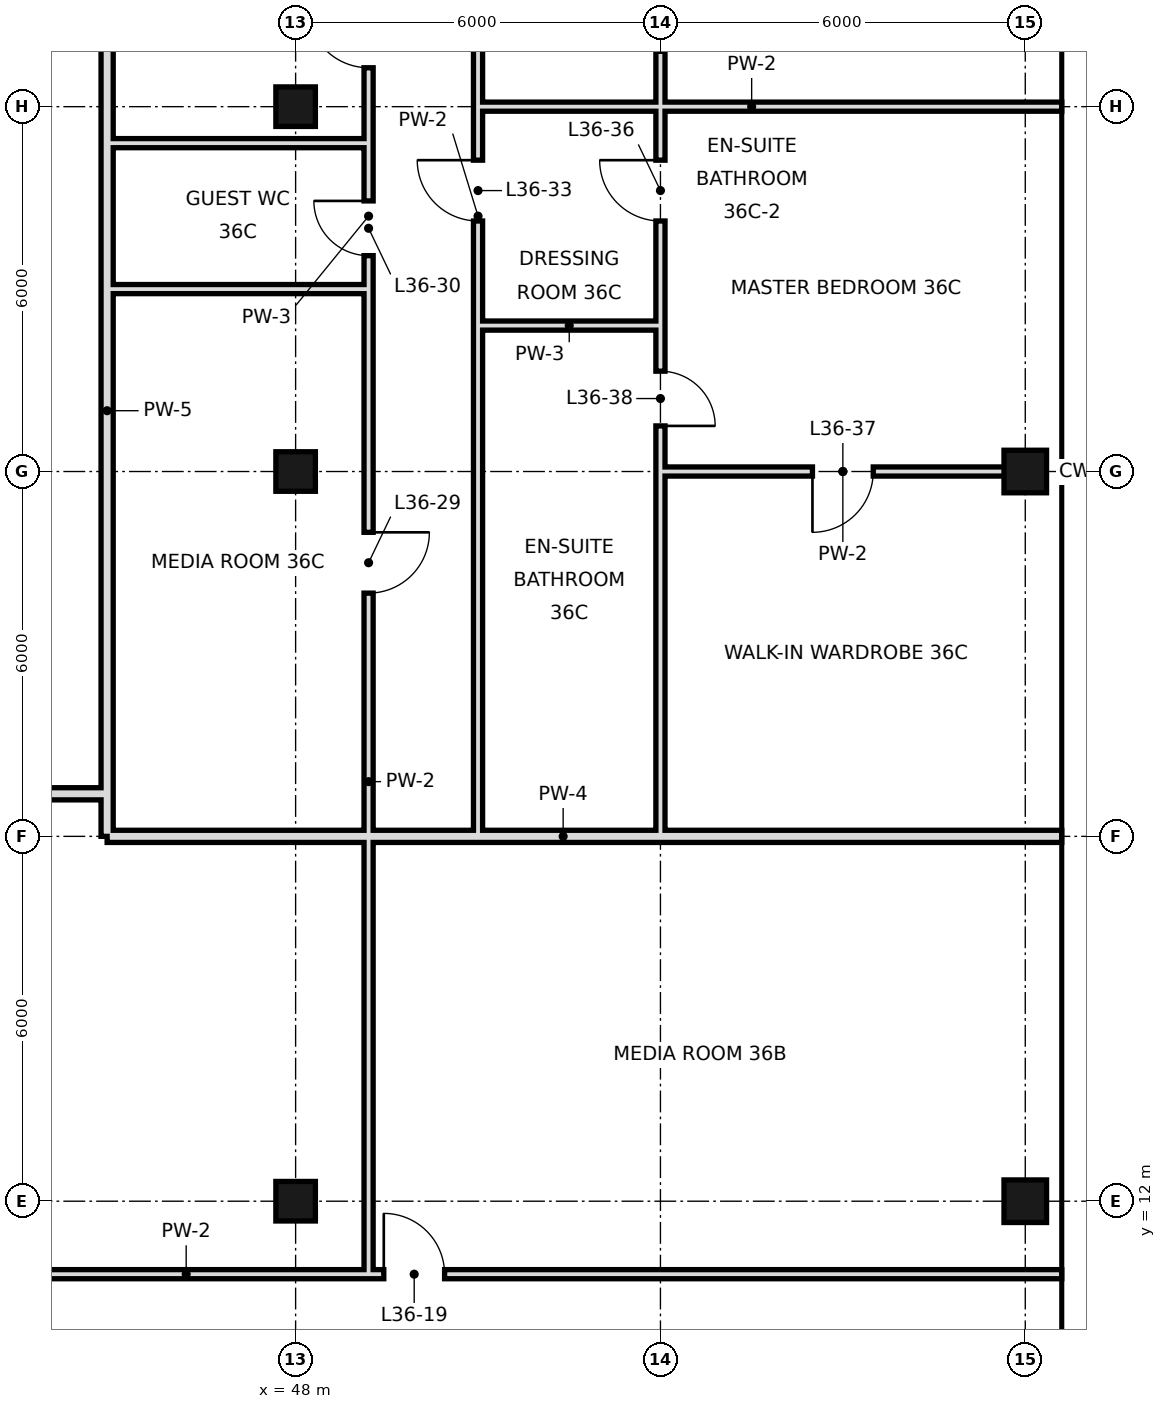
"""IFC4 building model, lengths in metres.
Left out: names, types, materials, properties, quantities, classifications, styles, units other than length and angle.
Written with IfcOpenShell. Run it as: python <this file> out.ifc"""

import sys

from ifc_helpers import new_model, si_unit, direction, frame, frame_2d, origin, origin_2d, place, context, subcontext, project, spatial, rectangle, hollow_rectangle, extrude, element, fill, save


model = new_model("IFC4")
c1 = context("Model", 3, precision=1e-05, world=origin(), true_north=direction((0.0, 1.0)))
c2 = subcontext(c1, "Body", "Model", "MODEL_VIEW")
j1 = project(units=[si_unit("LENGTHUNIT", "METRE"), si_unit("PLANEANGLEUNIT", "RADIAN")], contexts=[c1])
p1 = place(None, origin())
s1 = spatial("IfcSite", under=j1, at=p1, CompositionType="ELEMENT")
p2 = place(p1, origin())
s2 = spatial("IfcBuilding", under=s1, at=p2, CompositionType="ELEMENT")
p3 = place(p2, frame((0.0, 0.0, 158.2)))
s3 = spatial("IfcBuildingStorey", under=s2, at=p3, CompositionType="ELEMENT", Elevation=158.2)
for number, where, z_axis, x_axis in (
    (1, (48.0, 12.0, 0.0), (0.0, 0.0, 1.0), (1.0, 0.0, 0.0)),
    (2, (48.0, 24.0, 0.0), (0.0, 0.0, 1.0), (1.0, 0.0, 0.0)),
    (3, (48.0, 30.0, 0.0), (0.0, 0.0, 1.0), (1.0, 0.0, 0.0)),
):
    element("IfcColumn", number, at=place(p3, frame(where, z_axis=z_axis, x_axis=x_axis)), inside=s3, PredefinedType="COLUMN", context=c2, shape_type="SweptSolid", body=[
        extrude(hollow_rectangle(XDim=0.65, YDim=0.65, WallThickness=0.032, at=origin_2d()), origin(), (0.0, 0.0, 1.0), 3.6),
    ])
for number, where, z_axis, x_axis in (
    (4, (60.0, 12.0, 0.0), (0.0, 0.0, 1.0), (1.0, 0.0, 0.0)),
    (5, (60.0, 24.0, 0.0), (0.0, 0.0, 1.0), (1.0, 0.0, 0.0)),
):
    element("IfcColumn", number, at=place(p3, frame(where, z_axis=z_axis, x_axis=x_axis)), inside=s3, PredefinedType="COLUMN", context=c2, shape_type="SweptSolid", body=[
        extrude(hollow_rectangle(XDim=0.7, YDim=0.7, WallThickness=0.036, at=origin_2d()), origin(), (0.0, 0.0, 1.0), 3.6),
    ])
p4 = place(p3, frame((44.9, 18.7, 0.0), z_axis=(0.0, 0.0, 1.0), x_axis=(0.0, 1.0, 0.0)))
e6 = element("IfcWall", 6, at=p4, inside=s3, PredefinedType="SOLIDWALL", context=c2, shape_type="SweptSolid", body=[
    extrude(rectangle(XDim=25.7, YDim=0.2, at=frame_2d((12.85, 0.0))), origin(), (0.0, 0.0, 1.0), 2.93),
])
p5 = place(p4, frame((12.5, 0.0, 0.0)))
e7 = element("IfcOpeningElement", 7, at=p5, cuts=e6, PredefinedType="OPENING", context=c2, shape_type="SweptSolid", body=[
    extrude(rectangle(XDim=1.2, YDim=2.4, at=frame_2d((0.6, 1.2))), frame((0.0, 0.11, 0.0), z_axis=(0.0, -1.0, 0.0), x_axis=(1.0, 0.0, 0.0)), (0.0, 0.0, 1.0), 0.22),
])
p6 = place(p3, frame((44.9, 18.0, 0.0), z_axis=(0.0, 0.0, 1.0), x_axis=(0.0, 1.0, 0.0)))
e8 = element("IfcWall", 8, at=p6, inside=s3, PredefinedType="SOLIDWALL", context=c2, shape_type="SweptSolid", body=[
    extrude(rectangle(XDim=0.7, YDim=0.2, at=frame_2d((0.35, 0.0))), origin(), (0.0, 0.0, 1.0), 2.93),
])
p7 = place(p3, frame((49.2, 10.8, 0.0), z_axis=(0.0, 0.0, 1.0), x_axis=(0.0, 1.0, 0.0)))
e9 = element("IfcWall", 9, at=p7, inside=s3, PredefinedType="PARTITIONING", context=c2, shape_type="SweptSolid", body=[
    extrude(rectangle(XDim=16.2, YDim=0.15, at=frame_2d((8.1, 0.0))), origin(), (0.0, 0.0, 1.0), 3.38),
])
p8 = place(p7, frame((11.2, 0.0, 0.0)))
e10 = element("IfcOpeningElement", 10, at=p8, cuts=e9, PredefinedType="OPENING", context=c2, shape_type="SweptSolid", body=[
    extrude(rectangle(XDim=1.0, YDim=2.4, at=frame_2d((0.5, 1.2))), frame((0.0, 0.085, 0.0), z_axis=(0.0, -1.0, 0.0), x_axis=(1.0, 0.0, 0.0)), (0.0, 0.0, 1.0), 0.17),
])
p9 = place(p3, frame((49.2, 29.4, 0.0), z_axis=(0.0, 0.0, 1.0), x_axis=(0.0, 1.0, 0.0)))
e11 = element("IfcWall", 11, at=p9, inside=s3, PredefinedType="PARTITIONING", context=c2, shape_type="SweptSolid", body=[
    extrude(rectangle(XDim=15.0, YDim=0.15, at=frame_2d((7.5, 0.0))), origin(), (0.0, 0.0, 1.0), 3.38),
])
p10 = place(p9, frame((1.24, 0.0, 0.0)))
e12 = element("IfcOpeningElement", 12, at=p10, cuts=e11, PredefinedType="OPENING", context=c2, shape_type="SweptSolid", body=[
    extrude(rectangle(XDim=1.0, YDim=2.4, at=frame_2d((0.5, 1.2))), frame((0.0, 0.085, 0.0), z_axis=(0.0, -1.0, 0.0), x_axis=(1.0, 0.0, 0.0)), (0.0, 0.0, 1.0), 0.17),
])
p11 = place(p9, frame((9.4, 0.0, 0.0)))
e13 = element("IfcOpeningElement", 13, at=p11, cuts=e11, PredefinedType="OPENING", context=c2, shape_type="SweptSolid", body=[
    extrude(rectangle(XDim=1.0, YDim=2.4, at=frame_2d((0.5, 1.2))), frame((0.0, 0.085, 0.0), z_axis=(0.0, -1.0, 0.0), x_axis=(1.0, 0.0, 0.0)), (0.0, 0.0, 1.0), 0.17),
])
p12 = place(p3, frame((49.2, 27.0, 0.0), z_axis=(0.0, 0.0, 1.0), x_axis=(0.0, 1.0, 0.0)))
e14 = element("IfcWall", 14, at=p12, inside=s3, PredefinedType="PARTITIONING", context=c2, shape_type="SweptSolid", body=[
    extrude(rectangle(XDim=2.4, YDim=0.15, at=frame_2d((1.2, 0.0))), origin(), (0.0, 0.0, 1.0), 3.38),
])
p13 = place(p12, frame((0.55, 0.0, 0.0)))
e15 = element("IfcOpeningElement", 15, at=p13, cuts=e14, PredefinedType="OPENING", context=c2, shape_type="SweptSolid", body=[
    extrude(rectangle(XDim=0.9, YDim=2.4, at=frame_2d((0.45, 1.2))), frame((0.0, 0.085, 0.0), z_axis=(0.0, -1.0, 0.0), x_axis=(1.0, 0.0, 0.0)), (0.0, 0.0, 1.0), 0.17),
])
p14 = place(p3, frame((51.0, 26.4, 0.0), z_axis=(0.0, 0.0, 1.0), x_axis=(0.0, 1.0, 0.0)))
e16 = element("IfcWall", 16, at=p14, inside=s3, PredefinedType="PARTITIONING", context=c2, shape_type="SweptSolid", body=[
    extrude(rectangle(XDim=3.6, YDim=0.15, at=frame_2d((1.8, 0.0))), origin(), (0.0, 0.0, 1.0), 3.38),
])
p15 = place(p14, frame((1.72, 0.0, 0.0)))
e17 = element("IfcOpeningElement", 17, at=p15, cuts=e16, PredefinedType="OPENING", context=c2, shape_type="SweptSolid", body=[
    extrude(rectangle(XDim=1.0, YDim=2.4, at=frame_2d((0.5, 1.2))), frame((0.0, 0.085, 0.0), z_axis=(0.0, -1.0, 0.0), x_axis=(1.0, 0.0, 0.0)), (0.0, 0.0, 1.0), 0.17),
])
p16 = place(p3, frame((51.0, 18.0, 0.0), z_axis=(0.0, 0.0, 1.0), x_axis=(0.0, 1.0, 0.0)))
e18 = element("IfcWall", 18, at=p16, inside=s3, PredefinedType="PARTITIONING", context=c2, shape_type="SweptSolid", body=[
    extrude(rectangle(XDim=8.4, YDim=0.15, at=frame_2d((4.2, 0.0))), origin(), (0.0, 0.0, 1.0), 3.38),
])
p17 = place(p3, frame((51.0, 30.0, 0.0), z_axis=(0.0, 0.0, 1.0), x_axis=(0.0, 1.0, 0.0)))
e19 = element("IfcWall", 19, at=p17, inside=s3, PredefinedType="PARTITIONING", context=c2, shape_type="SweptSolid", body=[
    extrude(rectangle(XDim=3.6, YDim=0.15, at=frame_2d((1.8, 0.0))), origin(), (0.0, 0.0, 1.0), 3.38),
])
p18 = place(p3, frame((54.0, 26.4, 0.0), z_axis=(0.0, 0.0, 1.0), x_axis=(0.0, 1.0, 0.0)))
e20 = element("IfcWall", 20, at=p18, inside=s3, PredefinedType="PARTITIONING", context=c2, shape_type="SweptSolid", body=[
    extrude(rectangle(XDim=3.6, YDim=0.15, at=frame_2d((1.8, 0.0))), origin(), (0.0, 0.0, 1.0), 3.38),
])
p19 = place(p18, frame((1.72, 0.0, 0.0)))
e21 = element("IfcOpeningElement", 21, at=p19, cuts=e20, PredefinedType="OPENING", context=c2, shape_type="SweptSolid", body=[
    extrude(rectangle(XDim=1.0, YDim=2.4, at=frame_2d((0.5, 1.2))), frame((0.0, 0.085, 0.0), z_axis=(0.0, -1.0, 0.0), x_axis=(1.0, 0.0, 0.0)), (0.0, 0.0, 1.0), 0.17),
])
p20 = place(p3, frame((54.0, 18.0, 0.0), z_axis=(0.0, 0.0, 1.0), x_axis=(0.0, 1.0, 0.0)))
e22 = element("IfcWall", 22, at=p20, inside=s3, PredefinedType="PARTITIONING", context=c2, shape_type="SweptSolid", body=[
    extrude(rectangle(XDim=8.4, YDim=0.15, at=frame_2d((4.2, 0.0))), origin(), (0.0, 0.0, 1.0), 3.38),
])
p21 = place(p20, frame((6.75, 0.0, 0.0)))
e23 = element("IfcOpeningElement", 23, at=p21, cuts=e22, PredefinedType="OPENING", context=c2, shape_type="SweptSolid", body=[
    extrude(rectangle(XDim=0.9, YDim=2.4, at=frame_2d((0.45, 1.2))), frame((0.0, 0.085, 0.0), z_axis=(0.0, -1.0, 0.0), x_axis=(1.0, 0.0, 0.0)), (0.0, 0.0, 1.0), 0.17),
])
p22 = place(p3, frame((54.0, 30.0, 0.0), z_axis=(0.0, 0.0, 1.0), x_axis=(0.0, 1.0, 0.0)))
e24 = element("IfcWall", 24, at=p22, inside=s3, PredefinedType="PARTITIONING", context=c2, shape_type="SweptSolid", body=[
    extrude(rectangle(XDim=3.6, YDim=0.15, at=frame_2d((1.8, 0.0))), origin(), (0.0, 0.0, 1.0), 3.38),
])
p23 = place(p22, frame((0.91, 0.0, 0.0)))
e25 = element("IfcOpeningElement", 25, at=p23, cuts=e24, PredefinedType="OPENING", context=c2, shape_type="SweptSolid", body=[
    extrude(rectangle(XDim=0.9, YDim=2.4, at=frame_2d((0.45, 1.2))), frame((0.0, 0.085, 0.0), z_axis=(0.0, -1.0, 0.0), x_axis=(1.0, 0.0, 0.0)), (0.0, 0.0, 1.0), 0.17),
])
p24 = place(p3, frame((31.8, 10.8, 0.0), z_axis=(0.0, 0.0, 1.0), x_axis=(1.0, 0.0, 0.0)))
e26 = element("IfcWall", 26, at=p24, inside=s3, PredefinedType="PARTITIONING", context=c2, shape_type="SweptSolid", body=[
    extrude(rectangle(XDim=28.8, YDim=0.15, at=frame_2d((14.4, 0.0))), origin(), (0.0, 0.0, 1.0), 3.38),
])
p25 = place(p24, frame((1.6, 0.0, 0.0)))
e27 = element("IfcOpeningElement", 27, at=p25, cuts=e26, PredefinedType="OPENING", context=c2, shape_type="SweptSolid", body=[
    extrude(rectangle(XDim=1.0, YDim=2.4, at=frame_2d((0.5, 1.2))), frame((0.0, 0.085, 0.0), z_axis=(0.0, -1.0, 0.0), x_axis=(1.0, 0.0, 0.0)), (0.0, 0.0, 1.0), 0.17),
])
p26 = place(p24, frame((9.22, 0.0, 0.0)))
e28 = element("IfcOpeningElement", 28, at=p26, cuts=e26, PredefinedType="OPENING", context=c2, shape_type="SweptSolid", body=[
    extrude(rectangle(XDim=1.0, YDim=2.4, at=frame_2d((0.5, 1.2))), frame((0.0, 0.085, 0.0), z_axis=(0.0, -1.0, 0.0), x_axis=(1.0, 0.0, 0.0)), (0.0, 0.0, 1.0), 0.17),
])
p27 = place(p24, frame((17.65, 0.0, 0.0)))
e29 = element("IfcOpeningElement", 29, at=p27, cuts=e26, PredefinedType="OPENING", context=c2, shape_type="SweptSolid", body=[
    extrude(rectangle(XDim=1.0, YDim=2.4, at=frame_2d((0.5, 1.2))), frame((0.0, 0.085, 0.0), z_axis=(0.0, -1.0, 0.0), x_axis=(1.0, 0.0, 0.0)), (0.0, 0.0, 1.0), 0.17),
])
p28 = place(p3, frame((44.9, 18.0, 0.0), z_axis=(0.0, 0.0, 1.0), x_axis=(1.0, 0.0, 0.0)))
e30 = element("IfcWall", 30, at=p28, inside=s3, PredefinedType="SOLIDWALL", context=c2, shape_type="SweptSolid", body=[
    extrude(rectangle(XDim=15.7, YDim=0.2, at=frame_2d((7.85, 0.0))), origin(), (0.0, 0.0, 1.0), 2.68),
])
p29 = place(p3, frame((31.8, 18.7, 0.0), z_axis=(0.0, 0.0, 1.0), x_axis=(1.0, 0.0, 0.0)))
e31 = element("IfcWall", 31, at=p29, inside=s3, PredefinedType="SOLIDWALL", context=c2, shape_type="SweptSolid", body=[
    extrude(rectangle(XDim=13.1, YDim=0.2, at=frame_2d((6.55, 0.0))), origin(), (0.0, 0.0, 1.0), 2.68),
])
p30 = place(p29, frame((1.54, 0.0, 0.0)))
e32 = element("IfcOpeningElement", 32, at=p30, cuts=e31, PredefinedType="OPENING", context=c2, shape_type="SweptSolid", body=[
    extrude(rectangle(XDim=1.2, YDim=2.4, at=frame_2d((0.6, 1.2))), frame((0.0, 0.11, 0.0), z_axis=(0.0, -1.0, 0.0), x_axis=(1.0, 0.0, 0.0)), (0.0, 0.0, 1.0), 0.22),
])
p31 = place(p3, frame((54.0, 24.0, 0.0), z_axis=(0.0, 0.0, 1.0), x_axis=(1.0, 0.0, 0.0)))
e33 = element("IfcWall", 33, at=p31, inside=s3, PredefinedType="PARTITIONING", context=c2, shape_type="SweptSolid", body=[
    extrude(rectangle(XDim=6.0, YDim=0.15, at=frame_2d((3.0, 0.0))), origin(), (0.0, 0.0, 1.0), 2.68),
])
p32 = place(p31, frame((2.5, 0.0, 0.0)))
e34 = element("IfcOpeningElement", 34, at=p32, cuts=e33, PredefinedType="OPENING", context=c2, shape_type="SweptSolid", body=[
    extrude(rectangle(XDim=1.0, YDim=2.4, at=frame_2d((0.5, 1.2))), frame((0.0, 0.085, 0.0), z_axis=(0.0, -1.0, 0.0), x_axis=(1.0, 0.0, 0.0)), (0.0, 0.0, 1.0), 0.17),
])
p33 = place(p3, frame((51.0, 26.4, 0.0), z_axis=(0.0, 0.0, 1.0), x_axis=(1.0, 0.0, 0.0)))
e35 = element("IfcWall", 35, at=p33, inside=s3, PredefinedType="PARTITIONING", context=c2, shape_type="SweptSolid", body=[
    extrude(rectangle(XDim=3.0, YDim=0.15, at=frame_2d((1.5, 0.0))), origin(), (0.0, 0.0, 1.0), 3.38),
])
for number, where, z_axis, x_axis in (
    (36, (44.9, 27.0, 0.0), (0.0, 0.0, 1.0), (1.0, 0.0, 0.0)),
    (37, (44.9, 29.4, 0.0), (0.0, 0.0, 1.0), (1.0, 0.0, 0.0)),
):
    element("IfcWall", number, at=place(p3, frame(where, z_axis=z_axis, x_axis=x_axis)), inside=s3, PredefinedType="PARTITIONING", context=c2, shape_type="SweptSolid", body=[
        extrude(rectangle(XDim=4.3, YDim=0.15, at=frame_2d((2.15, 0.0))), origin(), (0.0, 0.0, 1.0), 3.38),
    ])
p34 = place(p3, frame((54.0, 30.0, 0.0), z_axis=(0.0, 0.0, 1.0), x_axis=(1.0, 0.0, 0.0)))
e38 = element("IfcWall", 38, at=p34, inside=s3, PredefinedType="PARTITIONING", context=c2, shape_type="SweptSolid", body=[
    extrude(rectangle(XDim=6.6, YDim=0.15, at=frame_2d((3.3, 0.0))), origin(), (0.0, 0.0, 1.0), 2.68),
])
p35 = place(p3, frame((51.0, 30.0, 0.0), z_axis=(0.0, 0.0, 1.0), x_axis=(1.0, 0.0, 0.0)))
e39 = element("IfcWall", 39, at=p35, inside=s3, PredefinedType="PARTITIONING", context=c2, shape_type="SweptSolid", body=[
    extrude(rectangle(XDim=3.0, YDim=0.15, at=frame_2d((1.5, 0.0))), origin(), (0.0, 0.0, 1.0), 2.68),
])
p36 = place(p27, origin())
e40 = element("IfcDoor", 40, at=p36, inside=s3, OperationType="SINGLE_SWING_LEFT", PredefinedType="DOOR", context=c2, shape_type="SweptSolid", body=[
    extrude(rectangle(XDim=1.0, YDim=2.4, at=frame_2d((0.5, 1.2))), frame((0.0, 0.025, 0.0), z_axis=(0.0, -1.0, 0.0), x_axis=(1.0, 0.0, 0.0)), (0.0, 0.0, 1.0), 0.05),
])
fill(e29, e40)
p37 = place(p10, frame((1.0, 0.0, 0.0), z_axis=(0.0, 0.0, 1.0), x_axis=(-1.0, 0.0, 0.0)))
e41 = element("IfcDoor", 41, at=p37, inside=s3, OperationType="SINGLE_SWING_LEFT", PredefinedType="DOOR", context=c2, shape_type="SweptSolid", body=[
    extrude(rectangle(XDim=1.0, YDim=2.4, at=frame_2d((0.5, 1.2))), frame((0.0, 0.025, 0.0), z_axis=(0.0, -1.0, 0.0), x_axis=(1.0, 0.0, 0.0)), (0.0, 0.0, 1.0), 0.05),
])
fill(e12, e41)
p38 = place(p8, origin())
e42 = element("IfcDoor", 42, at=p38, inside=s3, OperationType="SINGLE_SWING_RIGHT", PredefinedType="DOOR", context=c2, shape_type="SweptSolid", body=[
    extrude(rectangle(XDim=1.0, YDim=2.4, at=frame_2d((0.5, 1.2))), frame((0.0, 0.025, 0.0), z_axis=(0.0, -1.0, 0.0), x_axis=(1.0, 0.0, 0.0)), (0.0, 0.0, 1.0), 0.05),
])
fill(e10, e42)
p39 = place(p13, frame((0.9, 0.0, 0.0), z_axis=(0.0, 0.0, 1.0), x_axis=(-1.0, 0.0, 0.0)))
e43 = element("IfcDoor", 43, at=p39, inside=s3, OperationType="SINGLE_SWING_LEFT", PredefinedType="DOOR", context=c2, shape_type="SweptSolid", body=[
    extrude(rectangle(XDim=0.9, YDim=2.4, at=frame_2d((0.45, 1.2))), frame((0.0, 0.025, 0.0), z_axis=(0.0, -1.0, 0.0), x_axis=(1.0, 0.0, 0.0)), (0.0, 0.0, 1.0), 0.05),
])
fill(e15, e43)
p40 = place(p15, frame((1.0, 0.0, 0.0), z_axis=(0.0, 0.0, 1.0), x_axis=(-1.0, 0.0, 0.0)))
e44 = element("IfcDoor", 44, at=p40, inside=s3, OperationType="SINGLE_SWING_LEFT", PredefinedType="DOOR", context=c2, shape_type="SweptSolid", body=[
    extrude(rectangle(XDim=1.0, YDim=2.4, at=frame_2d((0.5, 1.2))), frame((0.0, 0.025, 0.0), z_axis=(0.0, -1.0, 0.0), x_axis=(1.0, 0.0, 0.0)), (0.0, 0.0, 1.0), 0.05),
])
fill(e17, e44)
p41 = place(p19, frame((1.0, 0.0, 0.0), z_axis=(0.0, 0.0, 1.0), x_axis=(-1.0, 0.0, 0.0)))
e45 = element("IfcDoor", 45, at=p41, inside=s3, OperationType="SINGLE_SWING_LEFT", PredefinedType="DOOR", context=c2, shape_type="SweptSolid", body=[
    extrude(rectangle(XDim=1.0, YDim=2.4, at=frame_2d((0.5, 1.2))), frame((0.0, 0.025, 0.0), z_axis=(0.0, -1.0, 0.0), x_axis=(1.0, 0.0, 0.0)), (0.0, 0.0, 1.0), 0.05),
])
fill(e21, e45)
p42 = place(p32, frame((1.0, 0.0, 0.0), z_axis=(0.0, 0.0, 1.0), x_axis=(-1.0, 0.0, 0.0)))
e46 = element("IfcDoor", 46, at=p42, inside=s3, OperationType="SINGLE_SWING_RIGHT", PredefinedType="DOOR", context=c2, shape_type="SweptSolid", body=[
    extrude(rectangle(XDim=1.0, YDim=2.4, at=frame_2d((0.5, 1.2))), frame((0.0, 0.025, 0.0), z_axis=(0.0, -1.0, 0.0), x_axis=(1.0, 0.0, 0.0)), (0.0, 0.0, 1.0), 0.05),
])
fill(e34, e46)
p43 = place(p21, frame((0.9, 0.0, 0.0), z_axis=(0.0, 0.0, 1.0), x_axis=(-1.0, 0.0, 0.0)))
e47 = element("IfcDoor", 47, at=p43, inside=s3, OperationType="SINGLE_SWING_RIGHT", PredefinedType="DOOR", context=c2, shape_type="SweptSolid", body=[
    extrude(rectangle(XDim=0.9, YDim=2.4, at=frame_2d((0.45, 1.2))), frame((0.0, 0.025, 0.0), z_axis=(0.0, -1.0, 0.0), x_axis=(1.0, 0.0, 0.0)), (0.0, 0.0, 1.0), 0.05),
])
fill(e23, e47)
save(model, sys.argv[1])
